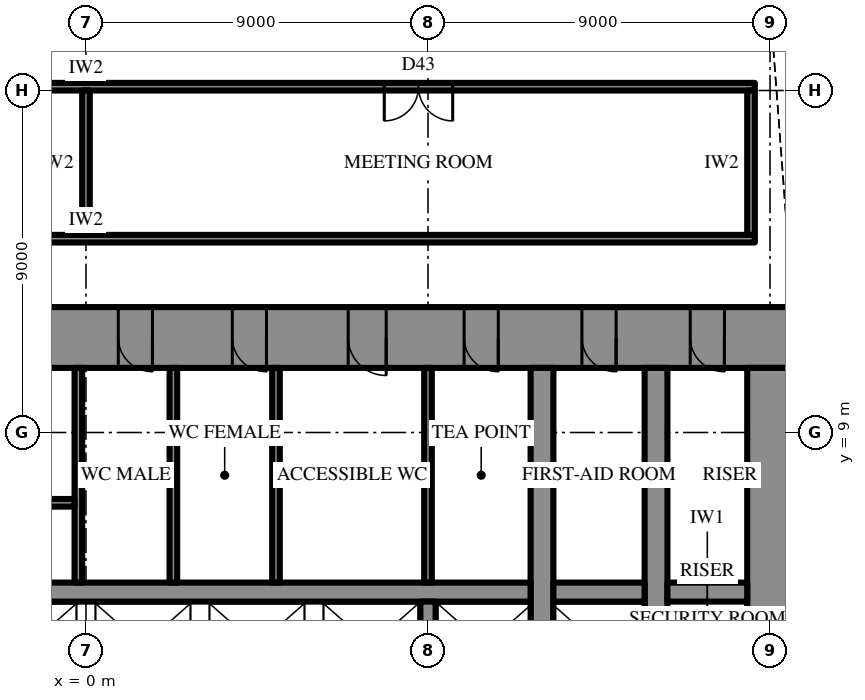
"""IFC4 building model, lengths in metres.
Left out: names, types, materials, properties, quantities, classifications, styles, units other than length and angle.
Written with IfcOpenShell. Run it as: python <this file> out.ifc"""

import sys

from ifc_helpers import new_model, si_unit, direction, frame, frame_2d, origin, place, context, subcontext, project, spatial, rectangle, extrude, element, fill, save


model = new_model("IFC4")
c1 = context("Model", 3, precision=1e-05, world=origin(), true_north=direction((0.0, 1.0)))
c2 = subcontext(c1, "Body", "Model", "MODEL_VIEW")
j1 = project(units=[si_unit("LENGTHUNIT", "METRE"), si_unit("PLANEANGLEUNIT", "RADIAN")], contexts=[c1])
p1 = place(None, origin())
s1 = spatial("IfcSite", under=j1, at=p1, CompositionType="ELEMENT")
p2 = place(p1, origin())
s2 = spatial("IfcBuilding", under=s1, at=p2, CompositionType="ELEMENT")
p3 = place(p2, frame((0.0, 0.0, 190.9)))
s3 = spatial("IfcBuildingStorey", under=s2, at=p3, CompositionType="ELEMENT", Elevation=190.9)
p4 = place(p3, frame((-18.6, 11.5, 0.0), z_axis=(0.0, 0.0, 1.0), x_axis=(1.0, 0.0, 0.0)))
e1 = element("IfcWall", 1, at=p4, inside=s3, PredefinedType="SHEAR", context=c2, shape_type="SweptSolid", body=[
    extrude(rectangle(XDim=37.2, YDim=1.6, at=frame_2d((18.6, 0.0))), origin(), (0.0, 0.0, 1.0), 4.2),
])
p5 = place(p4, frame((19.45, 0.0, 0.0)))
e2 = element("IfcOpeningElement", 2, at=p5, cuts=e1, PredefinedType="OPENING", context=c2, shape_type="SweptSolid", body=[
    extrude(rectangle(XDim=0.9, YDim=2.2, at=frame_2d((0.45, 1.1))), frame((0.0, 0.81, 0.0), z_axis=(0.0, -1.0, 0.0), x_axis=(1.0, 0.0, 0.0)), (0.0, 0.0, 1.0), 1.62),
])
p6 = place(p4, frame((22.45, 0.0, 0.0)))
e3 = element("IfcOpeningElement", 3, at=p6, cuts=e1, PredefinedType="OPENING", context=c2, shape_type="SweptSolid", body=[
    extrude(rectangle(XDim=0.9, YDim=2.2, at=frame_2d((0.45, 1.1))), frame((0.0, 0.81, 0.0), z_axis=(0.0, -1.0, 0.0), x_axis=(1.0, 0.0, 0.0)), (0.0, 0.0, 1.0), 1.62),
])
p7 = place(p4, frame((25.5, 0.0, 0.0)))
e4 = element("IfcOpeningElement", 4, at=p7, cuts=e1, PredefinedType="OPENING", context=c2, shape_type="SweptSolid", body=[
    extrude(rectangle(XDim=1.0, YDim=2.2, at=frame_2d((0.5, 1.1))), frame((0.0, 0.81, 0.0), z_axis=(0.0, -1.0, 0.0), x_axis=(1.0, 0.0, 0.0)), (0.0, 0.0, 1.0), 1.62),
])
p8 = place(p4, frame((1.8, 0.0, 0.0)))
e5 = element("IfcOpeningElement", 5, at=p8, cuts=e1, PredefinedType="OPENING", context=c2, shape_type="SweptSolid", body=[
    extrude(rectangle(XDim=0.9, YDim=2.2, at=frame_2d((0.45, 1.1))), frame((0.0, 0.81, 0.0), z_axis=(0.0, -1.0, 0.0), x_axis=(1.0, 0.0, 0.0)), (0.0, 0.0, 1.0), 1.62),
])
p9 = place(p4, frame((4.65, 0.0, 0.0)))
e6 = element("IfcOpeningElement", 6, at=p9, cuts=e1, PredefinedType="OPENING", context=c2, shape_type="SweptSolid", body=[
    extrude(rectangle(XDim=0.9, YDim=2.2, at=frame_2d((0.45, 1.1))), frame((0.0, 0.81, 0.0), z_axis=(0.0, -1.0, 0.0), x_axis=(1.0, 0.0, 0.0)), (0.0, 0.0, 1.0), 1.62),
])
p10 = place(p4, frame((7.75, 0.0, 0.0)))
e7 = element("IfcOpeningElement", 7, at=p10, cuts=e1, PredefinedType="OPENING", context=c2, shape_type="SweptSolid", body=[
    extrude(rectangle(XDim=0.9, YDim=2.2, at=frame_2d((0.45, 1.1))), frame((0.0, 0.81, 0.0), z_axis=(0.0, -1.0, 0.0), x_axis=(1.0, 0.0, 0.0)), (0.0, 0.0, 1.0), 1.62),
])
p11 = place(p4, frame((28.55, 0.0, 0.0)))
e8 = element("IfcOpeningElement", 8, at=p11, cuts=e1, PredefinedType="OPENING", context=c2, shape_type="SweptSolid", body=[
    extrude(rectangle(XDim=0.9, YDim=2.2, at=frame_2d((0.45, 1.1))), frame((0.0, 0.81, 0.0), z_axis=(0.0, -1.0, 0.0), x_axis=(1.0, 0.0, 0.0)), (0.0, 0.0, 1.0), 1.62),
])
p12 = place(p4, frame((31.65, 0.0, 0.0)))
e9 = element("IfcOpeningElement", 9, at=p12, cuts=e1, PredefinedType="OPENING", context=c2, shape_type="SweptSolid", body=[
    extrude(rectangle(XDim=0.9, YDim=2.2, at=frame_2d((0.45, 1.1))), frame((0.0, 0.81, 0.0), z_axis=(0.0, -1.0, 0.0), x_axis=(1.0, 0.0, 0.0)), (0.0, 0.0, 1.0), 1.62),
])
p13 = place(p4, frame((34.5, 0.0, 0.0)))
e10 = element("IfcOpeningElement", 10, at=p13, cuts=e1, PredefinedType="OPENING", context=c2, shape_type="SweptSolid", body=[
    extrude(rectangle(XDim=0.9, YDim=2.2, at=frame_2d((0.45, 1.1))), frame((0.0, 0.81, 0.0), z_axis=(0.0, -1.0, 0.0), x_axis=(1.0, 0.0, 0.0)), (0.0, 0.0, 1.0), 1.62),
])
p14 = place(p3, frame((18.0, -10.7, 0.0), z_axis=(0.0, 0.0, 1.0), x_axis=(0.0, 1.0, 0.0)))
e11 = element("IfcWall", 11, at=p14, inside=s3, PredefinedType="SHEAR", context=c2, shape_type="SweptSolid", body=[
    extrude(rectangle(XDim=21.4, YDim=1.2, at=frame_2d((10.7, 0.0))), origin(), (0.0, 0.0, 1.0), 4.2),
])
p15 = place(p14, frame((9.8, 0.0, 0.0)))
e12 = element("IfcOpeningElement", 12, at=p15, cuts=e11, PredefinedType="OPENING", context=c2, shape_type="SweptSolid", body=[
    extrude(rectangle(XDim=1.8, YDim=2.4, at=frame_2d((0.9, 1.2))), frame((0.0, 0.61, 0.0), z_axis=(0.0, -1.0, 0.0), x_axis=(1.0, 0.0, 0.0)), (0.0, 0.0, 1.0), 1.22),
])
p16 = place(p3, frame((12.0, -10.7, 0.0), z_axis=(0.0, 0.0, 1.0), x_axis=(0.0, 1.0, 0.0)))
e13 = element("IfcWall", 13, at=p16, inside=s3, PredefinedType="SHEAR", context=c2, shape_type="SweptSolid", body=[
    extrude(rectangle(XDim=21.4, YDim=0.6, at=frame_2d((10.7, 0.0))), origin(), (0.0, 0.0, 1.0), 4.2),
])
p17 = place(p16, frame((9.8, 0.0, 0.0)))
e14 = element("IfcOpeningElement", 14, at=p17, cuts=e13, PredefinedType="OPENING", context=c2, shape_type="SweptSolid", body=[
    extrude(rectangle(XDim=1.8, YDim=2.4, at=frame_2d((0.9, 1.2))), frame((0.0, 0.31, 0.0), z_axis=(0.0, -1.0, 0.0), x_axis=(1.0, 0.0, 0.0)), (0.0, 0.0, 1.0), 0.62),
])
p18 = place(p3, frame((15.0, -10.7, 0.0), z_axis=(0.0, 0.0, 1.0), x_axis=(0.0, 1.0, 0.0)))
e15 = element("IfcWall", 15, at=p18, inside=s3, PredefinedType="SHEAR", context=c2, shape_type="SweptSolid", body=[
    extrude(rectangle(XDim=21.4, YDim=0.6, at=frame_2d((10.7, 0.0))), origin(), (0.0, 0.0, 1.0), 4.2),
])
p19 = place(p18, frame((9.8, 0.0, 0.0)))
e16 = element("IfcOpeningElement", 16, at=p19, cuts=e15, PredefinedType="OPENING", context=c2, shape_type="SweptSolid", body=[
    extrude(rectangle(XDim=1.8, YDim=2.4, at=frame_2d((0.9, 1.2))), frame((0.0, 0.31, 0.0), z_axis=(0.0, -1.0, 0.0), x_axis=(1.0, 0.0, 0.0)), (0.0, 0.0, 1.0), 0.62),
])
p20 = place(p3, frame((-11.7, 4.8, 0.0), z_axis=(0.0, 0.0, 1.0), x_axis=(1.0, 0.0, 0.0)))
e17 = element("IfcWall", 17, at=p20, inside=s3, PredefinedType="SHEAR", context=c2, shape_type="SweptSolid", body=[
    extrude(rectangle(XDim=23.4, YDim=0.5, at=frame_2d((11.7, 0.0))), origin(), (0.0, 0.0, 1.0), 4.2),
])
p21 = place(p20, frame((6.6, 0.0, 0.0)))
e18 = element("IfcOpeningElement", 18, at=p21, cuts=e17, PredefinedType="OPENING", context=c2, shape_type="SweptSolid", body=[
    extrude(rectangle(XDim=1.2, YDim=2.2, at=frame_2d((0.6, 1.1))), frame((0.0, 0.26, 0.0), z_axis=(0.0, -1.0, 0.0), x_axis=(1.0, 0.0, 0.0)), (0.0, 0.0, 1.0), 0.52),
])
p22 = place(p20, frame((3.6, 0.0, 0.0)))
e19 = element("IfcOpeningElement", 19, at=p22, cuts=e17, PredefinedType="OPENING", context=c2, shape_type="SweptSolid", body=[
    extrude(rectangle(XDim=1.2, YDim=2.2, at=frame_2d((0.6, 1.1))), frame((0.0, 0.26, 0.0), z_axis=(0.0, -1.0, 0.0), x_axis=(1.0, 0.0, 0.0)), (0.0, 0.0, 1.0), 0.52),
])
p23 = place(p3, frame((12.3, 4.8, 0.0), z_axis=(0.0, 0.0, 1.0), x_axis=(1.0, 0.0, 0.0)))
e20 = element("IfcWall", 20, at=p23, inside=s3, PredefinedType="SHEAR", context=c2, shape_type="SweptSolid", body=[
    extrude(rectangle(XDim=2.4, YDim=0.5, at=frame_2d((1.2, 0.0))), origin(), (0.0, 0.0, 1.0), 4.2),
])
p24 = place(p3, frame((15.3, 4.8, 0.0), z_axis=(0.0, 0.0, 1.0), x_axis=(1.0, 0.0, 0.0)))
e21 = element("IfcWall", 21, at=p24, inside=s3, PredefinedType="SHEAR", context=c2, shape_type="SweptSolid", body=[
    extrude(rectangle(XDim=2.1, YDim=0.5, at=frame_2d((1.05, 0.0))), origin(), (0.0, 0.0, 1.0), 4.2),
])
p25 = place(p3, frame((9.0, 2.25, 0.0), z_axis=(0.0, 0.0, 1.0), x_axis=(0.0, 1.0, 0.0)))
e22 = element("IfcWall", 22, at=p25, inside=s3, PredefinedType="SHEAR", context=c2, shape_type="SweptSolid", body=[
    extrude(rectangle(XDim=2.3, YDim=0.4, at=frame_2d((1.15, 0.0))), origin(), (0.0, 0.0, 1.0), 4.2),
])
p26 = place(p3, frame((-0.2, 5.05, 0.0), z_axis=(0.0, 0.0, 1.0), x_axis=(0.0, 1.0, 0.0)))
e23 = element("IfcWall", 23, at=p26, inside=s3, PredefinedType="SHEAR", context=c2, shape_type="SweptSolid", body=[
    extrude(rectangle(XDim=5.65, YDim=0.2, at=frame_2d((2.825, 0.0))), origin(), (0.0, 0.0, 1.0), 4.2),
])
p27 = place(p3, frame((-8.9, 7.15, 0.0), z_axis=(0.0, 0.0, 1.0), x_axis=(1.0, 0.0, 0.0)))
e24 = element("IfcWall", 24, at=p27, inside=s3, PredefinedType="SHEAR", context=c2, shape_type="SweptSolid", body=[
    extrude(rectangle(XDim=8.6, YDim=0.2, at=frame_2d((4.3, 0.0))), origin(), (0.0, 0.0, 1.0), 4.2),
])
p28 = place(p27, frame((0.3, 0.0, 0.0)))
e25 = element("IfcOpeningElement", 25, at=p28, cuts=e24, PredefinedType="OPENING", context=c2, shape_type="SweptSolid", body=[
    extrude(rectangle(XDim=1.0, YDim=2.2, at=frame_2d((0.5, 1.1))), frame((0.0, 0.11, 0.0), z_axis=(0.0, -1.0, 0.0), x_axis=(1.0, 0.0, 0.0)), (0.0, 0.0, 1.0), 0.22),
])
for number, where, z_axis, x_axis in (
    (26, (9.0, 5.05, 0.0), (0.0, 0.0, 1.0), (0.0, 1.0, 0.0)),
    (27, (2.3, 5.05, 0.0), (0.0, 0.0, 1.0), (0.0, 1.0, 0.0)),
    (28, (5.0, 5.05, 0.0), (0.0, 0.0, 1.0), (0.0, 1.0, 0.0)),
):
    element("IfcWall", number, at=place(p3, frame(where, z_axis=z_axis, x_axis=x_axis)), inside=s3, PredefinedType="PARTITIONING", context=c2, shape_type="SweptSolid", body=[
        extrude(rectangle(XDim=5.65, YDim=0.2, at=frame_2d((2.825, 0.0))), origin(), (0.0, 0.0, 1.0), 4.0),
    ])
p29 = place(p3, frame((-17.6, 14.1, 0.0), z_axis=(0.0, 0.0, 1.0), x_axis=(1.0, 0.0, 0.0)))
e29 = element("IfcWall", 29, at=p29, inside=s3, PredefinedType="PARTITIONING", context=c2, shape_type="SweptSolid", body=[
    extrude(rectangle(XDim=35.2, YDim=0.2, at=frame_2d((17.6, 0.0))), origin(), (0.0, 0.0, 1.0), 4.0),
])
p30 = place(p3, frame((-17.6, 18.1, 0.0), z_axis=(0.0, 0.0, 1.0), x_axis=(1.0, 0.0, 0.0)))
e30 = element("IfcWall", 30, at=p30, inside=s3, PredefinedType="PARTITIONING", context=c2, shape_type="SweptSolid", body=[
    extrude(rectangle(XDim=35.2, YDim=0.2, at=frame_2d((17.6, 0.0))), origin(), (0.0, 0.0, 1.0), 4.0),
])
p31 = place(p30, frame((7.95, 0.0, 0.0)))
e31 = element("IfcOpeningElement", 31, at=p31, cuts=e30, PredefinedType="OPENING", context=c2, shape_type="SweptSolid", body=[
    extrude(rectangle(XDim=1.8, YDim=2.4, at=frame_2d((0.9, 1.2))), frame((0.0, 0.11, 0.0), z_axis=(0.0, -1.0, 0.0), x_axis=(1.0, 0.0, 0.0)), (0.0, 0.0, 1.0), 0.22),
])
p32 = place(p30, frame((25.45, 0.0, 0.0)))
e32 = element("IfcOpeningElement", 32, at=p32, cuts=e30, PredefinedType="OPENING", context=c2, shape_type="SweptSolid", body=[
    extrude(rectangle(XDim=1.8, YDim=2.4, at=frame_2d((0.9, 1.2))), frame((0.0, 0.11, 0.0), z_axis=(0.0, -1.0, 0.0), x_axis=(1.0, 0.0, 0.0)), (0.0, 0.0, 1.0), 0.22),
])
p33 = place(p3, frame((0.0, 14.2, 0.0), z_axis=(0.0, 0.0, 1.0), x_axis=(0.0, 1.0, 0.0)))
e33 = element("IfcWall", 33, at=p33, inside=s3, PredefinedType="PARTITIONING", context=c2, shape_type="SweptSolid", body=[
    extrude(rectangle(XDim=3.8, YDim=0.2, at=frame_2d((1.9, 0.0))), origin(), (0.0, 0.0, 1.0), 2.992),
])
p34 = place(p3, frame((17.5, 14.2, 0.0), z_axis=(0.0, 0.0, 1.0), x_axis=(0.0, 1.0, 0.0)))
e34 = element("IfcWall", 34, at=p34, inside=s3, PredefinedType="PARTITIONING", context=c2, shape_type="SweptSolid", body=[
    extrude(rectangle(XDim=3.8, YDim=0.2, at=frame_2d((1.9, 0.0))), origin(), (0.0, 0.0, 1.0), 4.0),
])
p35 = place(p3, frame((28.436, 4.747, 0.0), z_axis=(0.0, 0.0, 1.0), x_axis=(-0.499995666571, 0.866027905677, 0.0)))
e35 = element("IfcWall", 35, at=p35, inside=s3, PredefinedType="PARTITIONING", context=c2, shape_type="SweptSolid", body=[
    extrude(rectangle(XDim=20.215, YDim=0.2, at=frame_2d((10.107, 0.0))), origin(), (0.0, 0.0, 1.0), 4.0),
])
p36 = place(p35, frame((2.102, 0.0, 0.0)))
e36 = element("IfcOpeningElement", 36, at=p36, cuts=e35, PredefinedType="OPENING", context=c2, shape_type="SweptSolid", body=[
    extrude(rectangle(XDim=1.0, YDim=2.2, at=frame_2d((0.5, 1.1))), frame((0.0, 0.11, 0.0), z_axis=(0.0, -1.0, 0.0), x_axis=(1.0, 0.0, 0.0)), (0.0, 0.0, 1.0), 0.22),
])
p37 = place(p35, frame((7.105, 0.0, 0.0)))
e37 = element("IfcOpeningElement", 37, at=p37, cuts=e35, PredefinedType="OPENING", context=c2, shape_type="SweptSolid", body=[
    extrude(rectangle(XDim=1.0, YDim=2.2, at=frame_2d((0.5, 1.1))), frame((0.0, 0.11, 0.0), z_axis=(0.0, -1.0, 0.0), x_axis=(1.0, 0.0, 0.0)), (0.0, 0.0, 1.0), 0.22),
])
p38 = place(p35, frame((12.109, 0.0, 0.0)))
e38 = element("IfcOpeningElement", 38, at=p38, cuts=e35, PredefinedType="OPENING", context=c2, shape_type="SweptSolid", body=[
    extrude(rectangle(XDim=1.0, YDim=2.2, at=frame_2d((0.5, 1.1))), frame((0.0, 0.11, 0.0), z_axis=(0.0, -1.0, 0.0), x_axis=(1.0, 0.0, 0.0)), (0.0, 0.0, 1.0), 0.22),
])
p39 = place(p35, frame((17.113, 0.0, 0.0)))
e39 = element("IfcOpeningElement", 39, at=p39, cuts=e35, PredefinedType="OPENING", context=c2, shape_type="SweptSolid", body=[
    extrude(rectangle(XDim=1.0, YDim=2.2, at=frame_2d((0.5, 1.1))), frame((0.0, 0.11, 0.0), z_axis=(0.0, -1.0, 0.0), x_axis=(1.0, 0.0, 0.0)), (0.0, 0.0, 1.0), 0.22),
])
p40 = place(p5, frame((0.9, 0.0, 0.0), z_axis=(0.0, 0.0, 1.0), x_axis=(-1.0, 0.0, 0.0)))
e40 = element("IfcDoor", 40, at=p40, inside=s3, OperationType="SINGLE_SWING_RIGHT", PredefinedType="DOOR", context=c2, shape_type="SweptSolid", body=[
    extrude(rectangle(XDim=0.9, YDim=2.2, at=frame_2d((0.45, 1.1))), frame((0.0, 0.025, 0.0), z_axis=(0.0, -1.0, 0.0), x_axis=(1.0, 0.0, 0.0)), (0.0, 0.0, 1.0), 0.05),
])
fill(e2, e40)
p41 = place(p6, frame((0.9, 0.0, 0.0), z_axis=(0.0, 0.0, 1.0), x_axis=(-1.0, 0.0, 0.0)))
e41 = element("IfcDoor", 41, at=p41, inside=s3, OperationType="SINGLE_SWING_RIGHT", PredefinedType="DOOR", context=c2, shape_type="SweptSolid", body=[
    extrude(rectangle(XDim=0.9, YDim=2.2, at=frame_2d((0.45, 1.1))), frame((0.0, 0.025, 0.0), z_axis=(0.0, -1.0, 0.0), x_axis=(1.0, 0.0, 0.0)), (0.0, 0.0, 1.0), 0.05),
])
fill(e3, e41)
p42 = place(p7, frame((1.0, 0.0, 0.0), z_axis=(0.0, 0.0, 1.0), x_axis=(-1.0, 0.0, 0.0)))
e42 = element("IfcDoor", 42, at=p42, inside=s3, OperationType="SINGLE_SWING_RIGHT", PredefinedType="DOOR", context=c2, shape_type="SweptSolid", body=[
    extrude(rectangle(XDim=1.0, YDim=2.2, at=frame_2d((0.5, 1.1))), frame((0.0, 0.025, 0.0), z_axis=(0.0, -1.0, 0.0), x_axis=(1.0, 0.0, 0.0)), (0.0, 0.0, 1.0), 0.05),
])
fill(e4, e42)
p43 = place(p11, frame((0.9, 0.0, 0.0), z_axis=(0.0, 0.0, 1.0), x_axis=(-1.0, 0.0, 0.0)))
e43 = element("IfcDoor", 43, at=p43, inside=s3, OperationType="SINGLE_SWING_RIGHT", PredefinedType="DOOR", context=c2, shape_type="SweptSolid", body=[
    extrude(rectangle(XDim=0.9, YDim=2.2, at=frame_2d((0.45, 1.1))), frame((0.0, 0.025, 0.0), z_axis=(0.0, -1.0, 0.0), x_axis=(1.0, 0.0, 0.0)), (0.0, 0.0, 1.0), 0.05),
])
fill(e8, e43)
p44 = place(p12, frame((0.9, 0.0, 0.0), z_axis=(0.0, 0.0, 1.0), x_axis=(-1.0, 0.0, 0.0)))
e44 = element("IfcDoor", 44, at=p44, inside=s3, OperationType="SINGLE_SWING_RIGHT", PredefinedType="DOOR", context=c2, shape_type="SweptSolid", body=[
    extrude(rectangle(XDim=0.9, YDim=2.2, at=frame_2d((0.45, 1.1))), frame((0.0, 0.025, 0.0), z_axis=(0.0, -1.0, 0.0), x_axis=(1.0, 0.0, 0.0)), (0.0, 0.0, 1.0), 0.05),
])
fill(e9, e44)
p45 = place(p13, frame((0.9, 0.0, 0.0), z_axis=(0.0, 0.0, 1.0), x_axis=(-1.0, 0.0, 0.0)))
e45 = element("IfcDoor", 45, at=p45, inside=s3, OperationType="SINGLE_SWING_RIGHT", PredefinedType="DOOR", context=c2, shape_type="SweptSolid", body=[
    extrude(rectangle(XDim=0.9, YDim=2.2, at=frame_2d((0.45, 1.1))), frame((0.0, 0.025, 0.0), z_axis=(0.0, -1.0, 0.0), x_axis=(1.0, 0.0, 0.0)), (0.0, 0.0, 1.0), 0.05),
])
fill(e10, e45)
p46 = place(p32, frame((1.8, 0.0, 0.0), z_axis=(0.0, 0.0, 1.0), x_axis=(-1.0, 0.0, 0.0)))
e46 = element("IfcDoor", 46, at=p46, inside=s3, OperationType="DOUBLE_DOOR_SINGLE_SWING", PredefinedType="DOOR", context=c2, shape_type="SweptSolid", body=[
    extrude(rectangle(XDim=1.8, YDim=2.4, at=frame_2d((0.9, 1.2))), frame((0.0, 0.025, 0.0), z_axis=(0.0, -1.0, 0.0), x_axis=(1.0, 0.0, 0.0)), (0.0, 0.0, 1.0), 0.05),
])
fill(e32, e46)
save(model, sys.argv[1])
